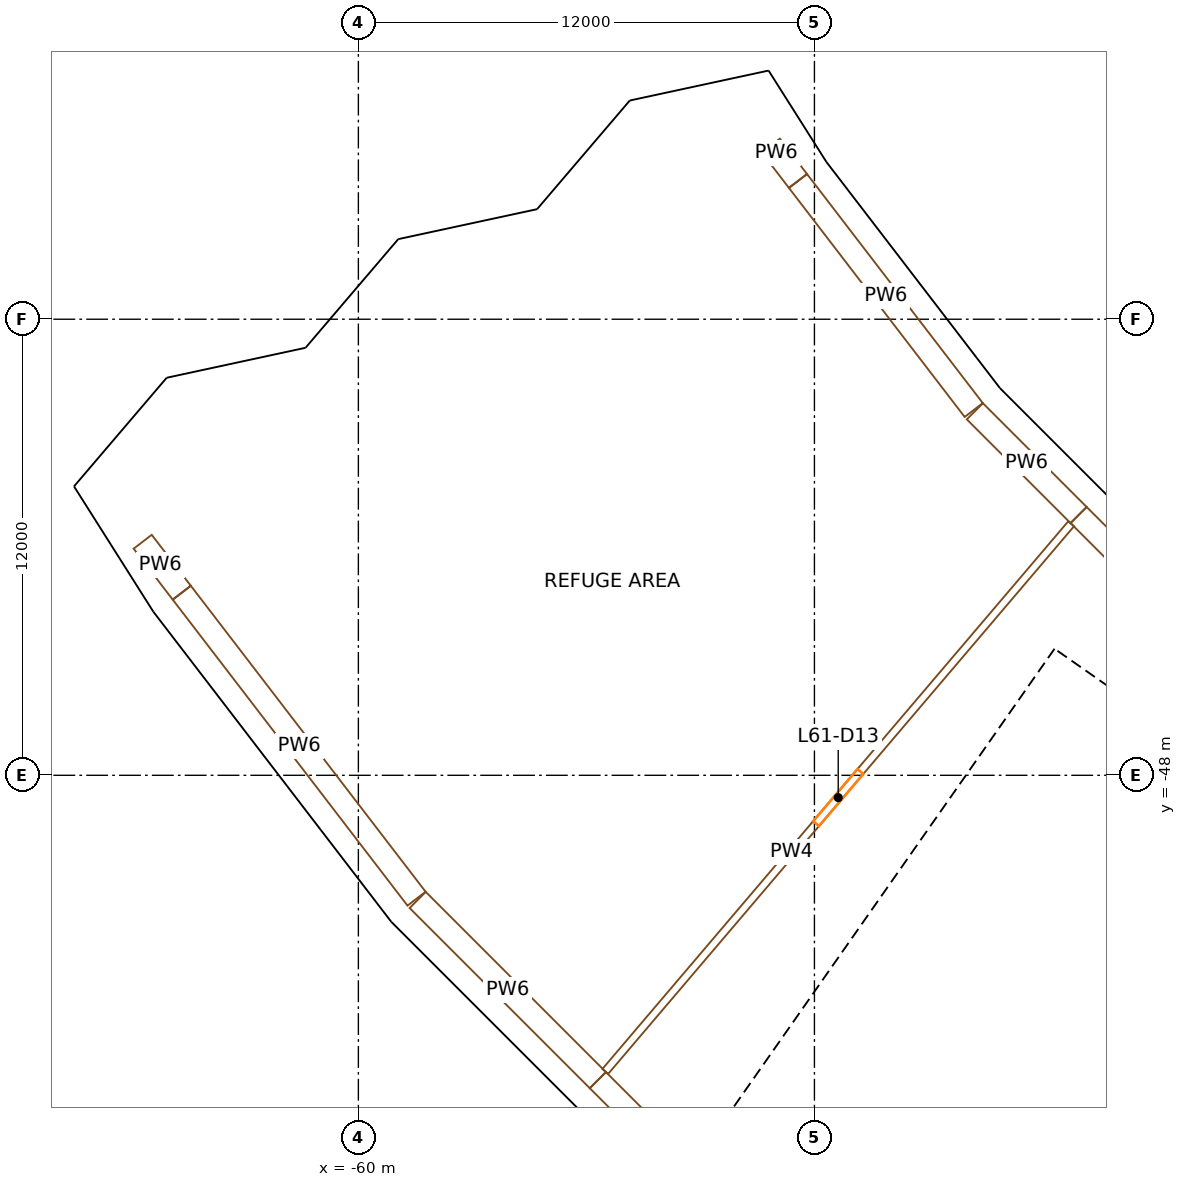
"""IFC4 building model, lengths in metres.
Left out: names, types, materials, properties, quantities, classifications, styles, units other than length and angle.
Written with IfcOpenShell. Run it as: python <this file> out.ifc"""

import sys

from ifc_helpers import new_model, si_unit, direction, frame, frame_2d, origin, origin_2d, place, context, subcontext, project, spatial, rectangle, extrude, element, fill, save


model = new_model("IFC4")
c1 = context("Model", 3, precision=1e-05, world=origin(), true_north=direction((0.0, 1.0)))
c2 = subcontext(c1, "Body", "Model", "MODEL_VIEW")
j1 = project(units=[si_unit("LENGTHUNIT", "METRE"), si_unit("PLANEANGLEUNIT", "RADIAN")], contexts=[c1])
p1 = place(None, origin())
s1 = spatial("IfcSite", under=j1, at=p1, CompositionType="ELEMENT")
p2 = place(p1, origin())
s2 = spatial("IfcBuilding", under=s1, at=p2, CompositionType="ELEMENT")
p3 = place(p2, frame((0.0, 0.0, 253.1)))
s3 = spatial("IfcBuildingStorey", under=s2, at=p3, CompositionType="ELEMENT", Elevation=253.1)
for number, where, z_axis, x_axis in (
    (1, (-48.433, -32.362, 0.0), (0.0, 0.0, 1.0), (0.556, -0.831, 0.0)),
    (2, (-64.647, -43.196, 0.0), (0.0, 0.0, 1.0), (0.556, -0.831, 0.0)),
    (3, (-43.795, -38.407, 0.0), (0.0, 0.0, 1.0), (0.659, -0.752, 0.0)),
    (4, (-58.456, -51.264, 0.0), (0.0, 0.0, 1.0), (0.659, -0.752, 0.0)),
):
    element("IfcColumn", number, at=place(p3, frame(where, z_axis=z_axis, x_axis=x_axis)), inside=s3, PredefinedType="COLUMN", context=c2, shape_type="SweptSolid", body=[
        extrude(rectangle(XDim=1.0, YDim=1.15, at=origin_2d()), origin(), (0.0, 0.0, 1.0), 5.0),
    ])
p4 = place(p3, frame((-49.483, -57.031, 0.0), z_axis=(0.0, 0.0, 1.0), x_axis=(0.573560421458, 0.819163257805, 0.0)))
e5 = element("IfcWall", 5, at=p4, inside=s3, PredefinedType="SHEAR", context=c2, shape_type="SweptSolid", body=[
    extrude(rectangle(XDim=14.2, YDim=0.6, at=frame_2d((7.1, 0.0))), origin(), (0.0, 0.0, 1.0), 4.7),
])
p5 = place(p4, frame((6.4, 0.0, 0.0)))
e6 = element("IfcOpeningElement", 6, at=p5, cuts=e5, PredefinedType="OPENING", context=c2, shape_type="SweptSolid", body=[
    extrude(rectangle(XDim=1.4, YDim=2.1, at=frame_2d((0.7, 1.05))), frame((0.0, 0.31, 0.0), z_axis=(0.0, -1.0, 0.0), x_axis=(1.0, 0.0, 0.0)), (0.0, 0.0, 1.0), 0.62),
])
p6 = place(p3, frame((-28.941, -54.447, 0.0), z_axis=(0.0, 0.0, 1.0), x_axis=(-0.819153391756, 0.573574511963, 0.0)))
e7 = element("IfcWall", 7, at=p6, inside=s3, PredefinedType="SHEAR", context=c2, shape_type="SweptSolid", body=[
    extrude(rectangle(XDim=15.045, YDim=0.6, at=frame_2d((7.523, 0.0))), origin(), (0.0, 0.0, 1.0), 4.7),
])
p7 = place(p6, frame((3.45, 0.0, 0.0)))
e8 = element("IfcOpeningElement", 8, at=p7, cuts=e7, PredefinedType="OPENING", context=c2, shape_type="SweptSolid", body=[
    extrude(rectangle(XDim=1.0, YDim=2.1, at=frame_2d((0.5, 1.05))), frame((0.0, 0.31, 0.0), z_axis=(0.0, -1.0, 0.0), x_axis=(1.0, 0.0, 0.0)), (0.0, 0.0, 1.0), 0.62),
])
p8 = place(p6, frame((13.495, 0.0, 0.0)))
e9 = element("IfcOpeningElement", 9, at=p8, cuts=e7, PredefinedType="OPENING", context=c2, shape_type="SweptSolid", body=[
    extrude(rectangle(XDim=1.1, YDim=2.1, at=frame_2d((0.55, 1.05))), frame((0.0, 0.31, 0.0), z_axis=(0.0, -1.0, 0.0), x_axis=(1.0, 0.0, 0.0)), (0.0, 0.0, 1.0), 0.62),
])
p9 = place(p3, frame((-36.741, -65.587, 0.0), z_axis=(0.0, 0.0, 1.0), x_axis=(-0.819153391756, 0.573574511963, 0.0)))
e10 = element("IfcWall", 10, at=p9, inside=s3, PredefinedType="SHEAR", context=c2, shape_type="SweptSolid", body=[
    extrude(rectangle(XDim=15.045, YDim=0.6, at=frame_2d((7.523, 0.0))), origin(), (0.0, 0.0, 1.0), 4.7),
])
p10 = place(p9, frame((3.45, 0.0, 0.0)))
e11 = element("IfcOpeningElement", 11, at=p10, cuts=e10, PredefinedType="OPENING", context=c2, shape_type="SweptSolid", body=[
    extrude(rectangle(XDim=1.0, YDim=2.1, at=frame_2d((0.5, 1.05))), frame((0.0, 0.31, 0.0), z_axis=(0.0, -1.0, 0.0), x_axis=(1.0, 0.0, 0.0)), (0.0, 0.0, 1.0), 0.62),
])
p11 = place(p9, frame((13.495, 0.0, 0.0)))
e12 = element("IfcOpeningElement", 12, at=p11, cuts=e10, PredefinedType="OPENING", context=c2, shape_type="SweptSolid", body=[
    extrude(rectangle(XDim=1.1, YDim=2.1, at=frame_2d((0.55, 1.05))), frame((0.0, 0.31, 0.0), z_axis=(0.0, -1.0, 0.0), x_axis=(1.0, 0.0, 0.0)), (0.0, 0.0, 1.0), 0.62),
])
p12 = place(p3, frame((-43.204, -60.696, 0.0), z_axis=(0.0, 0.0, 1.0), x_axis=(0.573571992966, 0.819155155563, 0.0)))
e13 = element("IfcWall", 13, at=p12, inside=s3, PredefinedType="SOLIDWALL", context=c2, shape_type="SweptSolid", body=[
    extrude(rectangle(XDim=13.0, YDim=0.3, at=frame_2d((6.5, 0.0))), origin(), (0.0, 0.0, 1.0), 4.7),
])
p13 = place(p3, frame((-33.787, -61.369, 0.0), z_axis=(0.0, 0.0, 1.0), x_axis=(-0.819152564888, 0.573575692858, 0.0)))
e14 = element("IfcWall", 14, at=p13, inside=s3, PredefinedType="SOLIDWALL", context=c2, shape_type="SweptSolid", body=[
    extrude(rectangle(XDim=7.95, YDim=0.3, at=frame_2d((3.975, 0.0))), origin(), (0.0, 0.0, 1.0), 4.7),
])
p14 = place(p13, frame((0.675, 0.0, 0.0)))
e15 = element("IfcOpeningElement", 15, at=p14, cuts=e14, PredefinedType="OPENING", context=c2, shape_type="SweptSolid", body=[
    extrude(rectangle(XDim=1.1, YDim=2.1, at=frame_2d((0.55, 1.05))), frame((0.0, 0.16, 0.0), z_axis=(0.0, -1.0, 0.0), x_axis=(1.0, 0.0, 0.0)), (0.0, 0.0, 1.0), 0.32),
])
p15 = place(p13, frame((3.425, 0.0, 0.0)))
e16 = element("IfcOpeningElement", 16, at=p15, cuts=e14, PredefinedType="OPENING", context=c2, shape_type="SweptSolid", body=[
    extrude(rectangle(XDim=1.1, YDim=2.1, at=frame_2d((0.55, 1.05))), frame((0.0, 0.16, 0.0), z_axis=(0.0, -1.0, 0.0), x_axis=(1.0, 0.0, 0.0)), (0.0, 0.0, 1.0), 0.32),
])
p16 = place(p13, frame((6.175, 0.0, 0.0)))
e17 = element("IfcOpeningElement", 17, at=p16, cuts=e14, PredefinedType="OPENING", context=c2, shape_type="SweptSolid", body=[
    extrude(rectangle(XDim=1.1, YDim=2.1, at=frame_2d((0.55, 1.05))), frame((0.0, 0.16, 0.0), z_axis=(0.0, -1.0, 0.0), x_axis=(1.0, 0.0, 0.0)), (0.0, 0.0, 1.0), 0.32),
])
p17 = place(p3, frame((-37.936, -52.91, 0.0), z_axis=(0.0, 0.0, 1.0), x_axis=(-0.819147518138, 0.57358290031, 0.0)))
e18 = element("IfcWall", 18, at=p17, inside=s3, PredefinedType="SOLIDWALL", context=c2, shape_type="SweptSolid", body=[
    extrude(rectangle(XDim=6.795, YDim=0.3, at=frame_2d((3.398, 0.0))), origin(), (0.0, 0.0, 1.0), 4.7),
])
p18 = place(p17, frame((5.32, 0.0, 0.0)))
e19 = element("IfcOpeningElement", 19, at=p18, cuts=e18, PredefinedType="OPENING", context=c2, shape_type="SweptSolid", body=[
    extrude(rectangle(XDim=1.1, YDim=2.1, at=frame_2d((0.55, 1.05))), frame((0.0, 0.16, 0.0), z_axis=(0.0, -1.0, 0.0), x_axis=(1.0, 0.0, 0.0)), (0.0, 0.0, 1.0), 0.32),
])
p19 = place(p3, frame((-41.262, -57.661, 0.0), z_axis=(0.0, 0.0, 1.0), x_axis=(-0.819164398642, 0.573558792102, 0.0)))
e20 = element("IfcWall", 20, at=p19, inside=s3, PredefinedType="SOLIDWALL", context=c2, shape_type="SweptSolid", body=[
    extrude(rectangle(XDim=6.795, YDim=0.3, at=frame_2d((3.397, 0.0))), origin(), (0.0, 0.0, 1.0), 4.7),
])
p20 = place(p19, frame((5.32, 0.0, 0.0)))
e21 = element("IfcOpeningElement", 21, at=p20, cuts=e20, PredefinedType="OPENING", context=c2, shape_type="SweptSolid", body=[
    extrude(rectangle(XDim=1.1, YDim=2.1, at=frame_2d((0.55, 1.05))), frame((0.0, 0.16, 0.0), z_axis=(0.0, -1.0, 0.0), x_axis=(1.0, 0.0, 0.0)), (0.0, 0.0, 1.0), 0.32),
])
p21 = place(p3, frame((-39.599, -55.285, 0.0), z_axis=(0.0, 0.0, 1.0), x_axis=(-0.819136323161, 0.573598887793, 0.0)))
e22 = element("IfcWall", 22, at=p21, inside=s3, PredefinedType="SOLIDWALL", context=c2, shape_type="SweptSolid", body=[
    extrude(rectangle(XDim=3.0, YDim=0.5, at=frame_2d((1.5, 0.0))), origin(), (0.0, 0.0, 1.0), 4.7),
])
p22 = place(p3, frame((-43.757, -55.731, 0.0), z_axis=(0.0, 0.0, 1.0), x_axis=(0.573536818435, 0.819179783625, 0.0)))
e23 = element("IfcWall", 23, at=p22, inside=s3, PredefinedType="SOLIDWALL", context=c2, shape_type="SweptSolid", body=[
    extrude(rectangle(XDim=5.5, YDim=0.3, at=frame_2d((2.75, 0.0))), origin(), (0.0, 0.0, 1.0), 4.7),
])
p23 = place(p22, frame((0.7, 0.0, 0.0)))
e24 = element("IfcOpeningElement", 24, at=p23, cuts=e23, PredefinedType="OPENING", context=c2, shape_type="SweptSolid", body=[
    extrude(rectangle(XDim=1.1, YDim=2.1, at=frame_2d((0.55, 1.05))), frame((0.0, 0.16, 0.0), z_axis=(0.0, -1.0, 0.0), x_axis=(1.0, 0.0, 0.0)), (0.0, 0.0, 1.0), 0.32),
])
p24 = place(p22, frame((3.7, 0.0, 0.0)))
e25 = element("IfcOpeningElement", 25, at=p24, cuts=e23, PredefinedType="OPENING", context=c2, shape_type="SweptSolid", body=[
    extrude(rectangle(XDim=1.1, YDim=2.1, at=frame_2d((0.55, 1.05))), frame((0.0, 0.16, 0.0), z_axis=(0.0, -1.0, 0.0), x_axis=(1.0, 0.0, 0.0)), (0.0, 0.0, 1.0), 0.32),
])
p25 = place(p3, frame((-41.587, -48.369, 0.0), z_axis=(0.0, 0.0, 1.0), x_axis=(0.573495128918, 0.819208970354, 0.0)))
e26 = element("IfcWall", 26, at=p25, inside=s3, PredefinedType="SOLIDWALL", context=c2, shape_type="SweptSolid", body=[
    extrude(rectangle(XDim=0.5, YDim=0.3, at=frame_2d((0.25, 0.0))), origin(), (0.0, 0.0, 1.0), 2.3),
])
p26 = place(p3, frame((-47.065, -56.192, 0.0), z_axis=(0.0, 0.0, 1.0), x_axis=(0.573822822947, 0.818979467304, 0.0)))
e27 = element("IfcWall", 27, at=p26, inside=s3, PredefinedType="SOLIDWALL", context=c2, shape_type="SweptSolid", body=[
    extrude(rectangle(XDim=0.5, YDim=0.3, at=frame_2d((0.25, 0.0))), origin(), (0.0, 0.0, 1.0), 2.3),
])
p27 = place(p3, frame((-49.12, -29.644, 0.0), z_axis=(0.0, 0.0, 1.0), x_axis=(-0.977521044082, -0.210837872253, 0.0)))
e28 = element("IfcWall", 28, at=p27, inside=s3, PredefinedType="SOLIDWALL", context=c2, shape_type="SweptSolid", body=[
    extrude(rectangle(XDim=3.834, YDim=0.4, at=frame_2d((1.917, 0.0))), origin(), (0.0, 0.0, 1.0), 3.6),
])
p28 = place(p3, frame((-52.891, -30.591, 0.0), z_axis=(0.0, 0.0, 1.0), x_axis=(-0.649109075573, -0.760695345068, 0.0)))
e29 = element("IfcWall", 29, at=p28, inside=s3, PredefinedType="SOLIDWALL", context=c2, shape_type="SweptSolid", body=[
    extrude(rectangle(XDim=3.326, YDim=0.4, at=frame_2d((1.663, 0.0))), origin(), (0.0, 0.0, 1.0), 3.6),
])
p29 = place(p3, frame((-55.073, -33.26, 0.0), z_axis=(0.0, 0.0, 1.0), x_axis=(-0.977490521889, -0.210979334573, 0.0)))
e30 = element("IfcWall", 30, at=p29, inside=s3, PredefinedType="SOLIDWALL", context=c2, shape_type="SweptSolid", body=[
    extrude(rectangle(XDim=3.977, YDim=0.4, at=frame_2d((1.989, 0.0))), origin(), (0.0, 0.0, 1.0), 3.6),
])
p30 = place(p3, frame((-58.984, -34.239, 0.0), z_axis=(0.0, 0.0, 1.0), x_axis=(-0.649047876816, -0.760747562337, 0.0)))
e31 = element("IfcWall", 31, at=p30, inside=s3, PredefinedType="SOLIDWALL", context=c2, shape_type="SweptSolid", body=[
    extrude(rectangle(XDim=3.324, YDim=0.4, at=frame_2d((1.662, 0.0))), origin(), (0.0, 0.0, 1.0), 3.6),
])
p31 = place(p3, frame((-61.165, -36.907, 0.0), z_axis=(0.0, 0.0, 1.0), x_axis=(-0.977476134156, -0.211045983511, 0.0)))
e32 = element("IfcWall", 32, at=p31, inside=s3, PredefinedType="SOLIDWALL", context=c2, shape_type="SweptSolid", body=[
    extrude(rectangle(XDim=3.978, YDim=0.4, at=frame_2d((1.989, 0.0))), origin(), (0.0, 0.0, 1.0), 3.6),
])
p32 = place(p3, frame((-65.076, -37.886, 0.0), z_axis=(0.0, 0.0, 1.0), x_axis=(-0.648973614046, -0.760810914927, 0.0)))
e33 = element("IfcWall", 33, at=p32, inside=s3, PredefinedType="SOLIDWALL", context=c2, shape_type="SweptSolid", body=[
    extrude(rectangle(XDim=3.078, YDim=0.4, at=frame_2d((1.539, 0.0))), origin(), (0.0, 0.0, 1.0), 3.6),
])
p33 = place(p3, frame((-47.869, -31.945, 0.0), z_axis=(0.0, 0.0, 1.0), x_axis=(-0.534803050784, 0.844976743391, 0.0)))
e34 = element("IfcWall", 34, at=p33, inside=s3, PredefinedType="SOLIDWALL", context=c2, shape_type="SweptSolid", body=[
    extrude(rectangle(XDim=2.426, YDim=0.4, at=frame_2d((1.213, 0.0))), origin(), (0.0, 0.0, 1.0), 3.6),
])
p34 = place(p3, frame((-43.253, -37.966, 0.0), z_axis=(0.0, 0.0, 1.0), x_axis=(-0.608757884363, 0.793356060181, 0.0)))
e35 = element("IfcWall", 35, at=p34, inside=s3, PredefinedType="SOLIDWALL", context=c2, shape_type="SweptSolid", body=[
    extrude(rectangle(XDim=7.569, YDim=0.4, at=frame_2d((3.784, 0.0))), origin(), (0.0, 0.0, 1.0), 3.6),
])
p35 = place(p3, frame((-37.981, -43.233, 0.0), z_axis=(0.0, 0.0, 1.0), x_axis=(-0.707106781187, 0.707106781187, 0.0)))
e36 = element("IfcWall", 36, at=p35, inside=s3, PredefinedType="SOLIDWALL", context=c2, shape_type="SweptSolid", body=[
    extrude(rectangle(XDim=7.427, YDim=0.4, at=frame_2d((3.713, 0.0))), origin(), (0.0, 0.0, 1.0), 3.6),
])
p36 = place(p3, frame((-67.336, -40.255, 0.0), z_axis=(0.0, 0.0, 1.0), x_axis=(0.534789845783, -0.844985100962, 0.0)))
e37 = element("IfcWall", 37, at=p36, inside=s3, PredefinedType="SOLIDWALL", context=c2, shape_type="SweptSolid", body=[
    extrude(rectangle(XDim=1.994, YDim=0.4, at=frame_2d((0.997, 0.0))), origin(), (0.0, 0.0, 1.0), 3.6),
])
p37 = place(p3, frame((-66.27, -41.94, 0.0), z_axis=(0.0, 0.0, 1.0), x_axis=(0.534788596857, -0.844985891404, 0.0)))
e38 = element("IfcWall", 38, at=p37, inside=s3, PredefinedType="SOLIDWALL", context=c2, shape_type="SweptSolid", body=[
    extrude(rectangle(XDim=1.962, YDim=0.4, at=frame_2d((0.981, 0.0))), origin(), (0.0, 0.0, 1.0), 3.6),
])
p38 = place(p3, frame((-65.208, -43.611, 0.0), z_axis=(0.0, 0.0, 1.0), x_axis=(0.608772438843, -0.793344892027, 0.0)))
e39 = element("IfcWall", 39, at=p38, inside=s3, PredefinedType="SOLIDWALL", context=c2, shape_type="SweptSolid", body=[
    extrude(rectangle(XDim=10.177, YDim=0.4, at=frame_2d((5.089, 0.0))), origin(), (0.0, 0.0, 1.0), 3.6),
])
p39 = place(p3, frame((-58.999, -51.708, 0.0), z_axis=(0.0, 0.0, 1.0), x_axis=(0.707106781187, -0.707106781187, 0.0)))
e40 = element("IfcWall", 40, at=p39, inside=s3, PredefinedType="SOLIDWALL", context=c2, shape_type="SweptSolid", body=[
    extrude(rectangle(XDim=10.312, YDim=0.4, at=frame_2d((5.156, 0.0))), origin(), (0.0, 0.0, 1.0), 3.6),
])
p40 = place(p3, frame((-65.675, -41.855, 0.0), z_axis=(0.0, 0.0, 1.0), x_axis=(0.608765812446, -0.793349976743, 0.0)))
e41 = element("IfcWall", 41, at=p40, inside=s3, PredefinedType="PARTITIONING", context=c2, shape_type="SweptSolid", body=[
    extrude(rectangle(XDim=1.686, YDim=0.6, at=frame_2d((0.843, 0.0))), origin(), (0.0, 0.0, 1.0), 3.6),
])
p41 = place(p3, frame((-64.645, -43.198, 0.0), z_axis=(0.0, 0.0, 1.0), x_axis=(0.608777573681, -0.793340951787, 0.0)))
e42 = element("IfcWall", 42, at=p41, inside=s3, PredefinedType="PARTITIONING", context=c2, shape_type="SweptSolid", body=[
    extrude(rectangle(XDim=10.145, YDim=0.6, at=frame_2d((5.072, 0.0))), origin(), (0.0, 0.0, 1.0), 3.6),
])
p42 = place(p3, frame((-58.439, -51.28, 0.0), z_axis=(0.0, 0.0, 1.0), x_axis=(0.707106781187, -0.707106781187, 0.0)))
e43 = element("IfcWall", 43, at=p42, inside=s3, PredefinedType="PARTITIONING", context=c2, shape_type="SweptSolid", body=[
    extrude(rectangle(XDim=6.704, YDim=0.6, at=frame_2d((3.352, 0.0))), origin(), (0.0, 0.0, 1.0), 3.6),
])
p43 = place(p3, frame((-53.699, -56.021, 0.0), z_axis=(0.0, 0.0, 1.0), x_axis=(0.707106781187, -0.707106781187, 0.0)))
e44 = element("IfcWall", 44, at=p43, inside=s3, PredefinedType="PARTITIONING", context=c2, shape_type="SweptSolid", body=[
    extrude(rectangle(XDim=3.42, YDim=0.6, at=frame_2d((1.71, 0.0))), origin(), (0.0, 0.0, 1.0), 3.6),
])
p44 = place(p3, frame((-49.147, -31.432, 0.0), z_axis=(0.0, 0.0, 1.0), x_axis=(0.608812675786, -0.793314014626, 0.0)))
e45 = element("IfcWall", 45, at=p44, inside=s3, PredefinedType="PARTITIONING", context=c2, shape_type="SweptSolid", body=[
    extrude(rectangle(XDim=1.17, YDim=0.6, at=frame_2d((0.585, 0.0))), origin(), (0.0, 0.0, 1.0), 3.6),
])
p45 = place(p3, frame((-48.431, -32.364, 0.0), z_axis=(0.0, 0.0, 1.0), x_axis=(0.608775025132, -0.793342907434, 0.0)))
e46 = element("IfcWall", 46, at=p45, inside=s3, PredefinedType="PARTITIONING", context=c2, shape_type="SweptSolid", body=[
    extrude(rectangle(XDim=7.594, YDim=0.6, at=frame_2d((3.797, 0.0))), origin(), (0.0, 0.0, 1.0), 3.6),
])
p46 = place(p3, frame((-43.779, -38.423, 0.0), z_axis=(0.0, 0.0, 1.0), x_axis=(0.707075152498, -0.707138408461, 0.0)))
e47 = element("IfcWall", 47, at=p46, inside=s3, PredefinedType="PARTITIONING", context=c2, shape_type="SweptSolid", body=[
    extrude(rectangle(XDim=3.86, YDim=0.6, at=frame_2d((1.93, 0.0))), origin(), (0.0, 0.0, 1.0), 3.6),
])
p47 = place(p3, frame((-53.504, -55.792, 0.0), z_axis=(0.0, 0.0, 1.0), x_axis=(0.647960358765, 0.761674059864, 0.0)))
e48 = element("IfcWall", 48, at=p47, inside=s3, PredefinedType="PARTITIONING", context=c2, shape_type="SweptSolid", body=[
    extrude(rectangle(XDim=18.921, YDim=0.2, at=frame_2d((9.461, 0.0))), origin(), (0.0, 0.0, 1.0), 3.6),
])
p48 = place(p47, frame((8.561, 0.0, 0.0)))
e49 = element("IfcOpeningElement", 49, at=p48, cuts=e48, PredefinedType="OPENING", context=c2, shape_type="SweptSolid", body=[
    extrude(rectangle(XDim=1.8, YDim=2.4, at=frame_2d((0.9, 1.2))), frame((0.0, 0.11, 0.0), z_axis=(0.0, -1.0, 0.0), x_axis=(1.0, 0.0, 0.0)), (0.0, 0.0, 1.0), 0.22),
])
p49 = place(p3, frame((-41.05, -41.152, 0.0), z_axis=(0.0, 0.0, 1.0), x_axis=(0.707139643126, -0.70707391772, 0.0)))
e50 = element("IfcWall", 50, at=p49, inside=s3, PredefinedType="PARTITIONING", context=c2, shape_type="SweptSolid", body=[
    extrude(rectangle(XDim=3.715, YDim=0.6, at=frame_2d((1.857, 0.0))), origin(), (0.0, 0.0, 1.0), 3.6),
])
p50 = place(p23, origin())
e51 = element("IfcDoor", 51, at=p50, inside=s3, OperationType="DOUBLE_DOOR_SLIDING", PredefinedType="DOOR", context=c2, shape_type="SweptSolid", body=[
    extrude(rectangle(XDim=1.1, YDim=2.1, at=frame_2d((0.55, 1.05))), frame((0.0, 0.025, 0.0), z_axis=(0.0, -1.0, 0.0), x_axis=(1.0, 0.0, 0.0)), (0.0, 0.0, 1.0), 0.05),
])
fill(e24, e51)
p51 = place(p24, origin())
e52 = element("IfcDoor", 52, at=p51, inside=s3, OperationType="DOUBLE_DOOR_SLIDING", PredefinedType="DOOR", context=c2, shape_type="SweptSolid", body=[
    extrude(rectangle(XDim=1.1, YDim=2.1, at=frame_2d((0.55, 1.05))), frame((0.0, 0.025, 0.0), z_axis=(0.0, -1.0, 0.0), x_axis=(1.0, 0.0, 0.0)), (0.0, 0.0, 1.0), 0.05),
])
fill(e25, e52)
p52 = place(p5, origin())
e53 = element("IfcDoor", 53, at=p52, inside=s3, OperationType="DOUBLE_DOOR_SINGLE_SWING", PredefinedType="DOOR", context=c2, shape_type="SweptSolid", body=[
    extrude(rectangle(XDim=1.4, YDim=2.1, at=frame_2d((0.7, 1.05))), frame((0.0, 0.025, 0.0), z_axis=(0.0, -1.0, 0.0), x_axis=(1.0, 0.0, 0.0)), (0.0, 0.0, 1.0), 0.05),
])
fill(e6, e53)
p53 = place(p8, origin())
e54 = element("IfcDoor", 54, at=p53, inside=s3, OperationType="SINGLE_SWING_RIGHT", PredefinedType="DOOR", context=c2, shape_type="SweptSolid", body=[
    extrude(rectangle(XDim=1.1, YDim=2.1, at=frame_2d((0.55, 1.05))), frame((0.0, 0.025, 0.0), z_axis=(0.0, -1.0, 0.0), x_axis=(1.0, 0.0, 0.0)), (0.0, 0.0, 1.0), 0.05),
])
fill(e9, e54)
p54 = place(p18, origin())
e55 = element("IfcDoor", 55, at=p54, inside=s3, OperationType="SINGLE_SWING_LEFT", PredefinedType="DOOR", context=c2, shape_type="SweptSolid", body=[
    extrude(rectangle(XDim=1.1, YDim=2.1, at=frame_2d((0.55, 1.05))), frame((0.0, 0.025, 0.0), z_axis=(0.0, -1.0, 0.0), x_axis=(1.0, 0.0, 0.0)), (0.0, 0.0, 1.0), 0.05),
])
fill(e19, e55)
p55 = place(p20, origin())
e56 = element("IfcDoor", 56, at=p55, inside=s3, OperationType="SINGLE_SWING_LEFT", PredefinedType="DOOR", context=c2, shape_type="SweptSolid", body=[
    extrude(rectangle(XDim=1.1, YDim=2.1, at=frame_2d((0.55, 1.05))), frame((0.0, 0.025, 0.0), z_axis=(0.0, -1.0, 0.0), x_axis=(1.0, 0.0, 0.0)), (0.0, 0.0, 1.0), 0.05),
])
fill(e21, e56)
p56 = place(p48, origin())
e57 = element("IfcDoor", 57, at=p56, inside=s3, OperationType="DOUBLE_DOOR_SINGLE_SWING", PredefinedType="DOOR", context=c2, shape_type="SweptSolid", body=[
    extrude(rectangle(XDim=1.8, YDim=2.4, at=frame_2d((0.9, 1.2))), frame((0.0, 0.025, 0.0), z_axis=(0.0, -1.0, 0.0), x_axis=(1.0, 0.0, 0.0)), (0.0, 0.0, 1.0), 0.05),
])
fill(e49, e57)
save(model, sys.argv[1])
